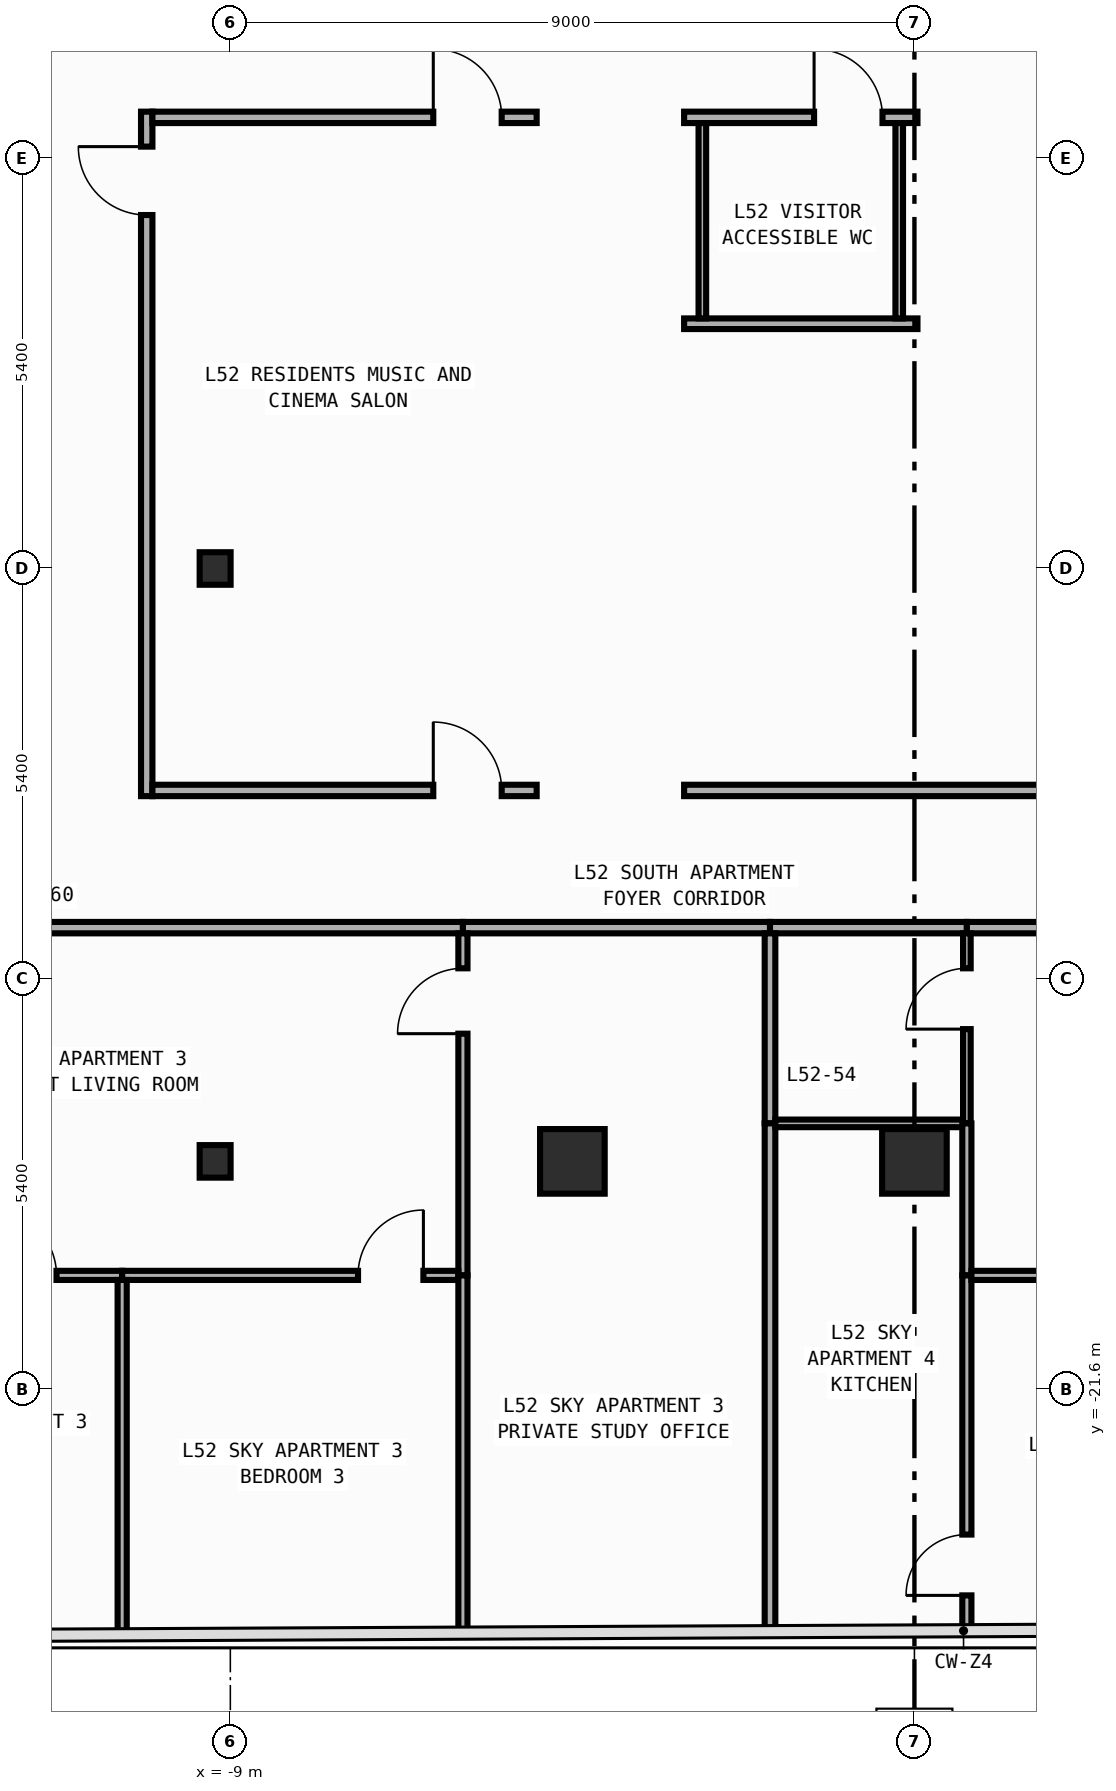
"""IFC4 building model, lengths in metres.
Left out: names, types, materials, properties, quantities, classifications, styles, units other than length and angle.
Written with IfcOpenShell. Run it as: python <this file> out.ifc"""

import sys

from ifc_helpers import new_model, si_unit, direction, frame, frame_2d, origin, origin_2d, place, context, subcontext, project, spatial, rectangle, i_section, extrude, element, fill, save


model = new_model("IFC4")
c1 = context("Model", 3, precision=1e-05, world=origin(), true_north=direction((0.0, 1.0)))
c2 = subcontext(c1, "Body", "Model", "MODEL_VIEW")
j1 = project(units=[si_unit("LENGTHUNIT", "METRE"), si_unit("PLANEANGLEUNIT", "RADIAN")], contexts=[c1])
p1 = place(None, origin())
s1 = spatial("IfcSite", under=j1, at=p1, CompositionType="ELEMENT")
p2 = place(p1, origin())
s2 = spatial("IfcBuilding", under=s1, at=p2, CompositionType="ELEMENT")
p3 = place(p2, frame((0.0, 0.0, 226.0)))
s3 = spatial("IfcBuildingStorey", under=s2, at=p3, CompositionType="ELEMENT", Elevation=226.0)
for number, where, z_axis, x_axis in (
    (1, (-9.2, -18.6, 0.0), (0.0, 0.0, 1.0), (1.0, 0.0, 0.0)),
    (2, (-9.2, -10.8, 0.0), (0.0, 0.0, 1.0), (1.0, 0.0, 0.0)),
):
    element("IfcColumn", number, at=place(p3, frame(where, z_axis=z_axis, x_axis=x_axis)), inside=s3, PredefinedType="COLUMN", context=c2, shape_type="SweptSolid", body=[
        extrude(i_section(OverallWidth=0.407, OverallDepth=0.428, WebThickness=0.02, FlangeThickness=0.035, FilletRadius=0.022, at=origin_2d()), origin(), (0.0, 0.0, 1.0), 3.6),
    ])
for number, where, z_axis, x_axis in (
    (3, (-4.5, -18.6, 0.0), (0.0, 0.0, 1.0), (1.0, 0.0, 0.0)),
    (4, (0.0, -18.6, 0.0), (0.0, 0.0, 1.0), (1.0, 0.0, 0.0)),
):
    element("IfcColumn", number, at=place(p3, frame(where, z_axis=z_axis, x_axis=x_axis)), inside=s3, PredefinedType="COLUMN", context=c2, shape_type="SweptSolid", body=[
        extrude(rectangle(XDim=0.85, YDim=0.85, at=origin_2d()), origin(), (0.0, 0.0, 1.0), 3.6),
    ])
p4 = place(p3, frame((-10.1, -13.795, 0.0), z_axis=(0.0, 0.0, 1.0), x_axis=(0.0, 1.0, 0.0)))
e5 = element("IfcWall", 5, at=p4, inside=s3, PredefinedType="PARTITIONING", context=c2, shape_type="SweptSolid", body=[
    extrude(rectangle(XDim=9.005, YDim=0.15, at=frame_2d((4.502, 0.0))), origin(), (0.0, 0.0, 1.0), 3.34),
])
p5 = place(p4, frame((7.645, 0.0, 0.0)))
e6 = element("IfcOpeningElement", 6, at=p5, cuts=e5, PredefinedType="OPENING", context=c2, shape_type="SweptSolid", body=[
    extrude(rectangle(XDim=0.9, YDim=2.15, at=frame_2d((0.45, 1.075))), frame((0.0, 0.085, 0.0), z_axis=(0.0, -1.0, 0.0), x_axis=(1.0, 0.0, 0.0)), (0.0, 0.0, 1.0), 0.17),
])
p6 = place(p3, frame((-10.025, -4.865, 0.0), z_axis=(0.0, 0.0, 1.0), x_axis=(1.0, 0.0, 0.0)))
e7 = element("IfcWall", 7, at=p6, inside=s3, PredefinedType="PARTITIONING", context=c2, shape_type="SweptSolid", body=[
    extrude(rectangle(XDim=5.055, YDim=0.15, at=frame_2d((2.527, 0.0))), origin(), (0.0, 0.0, 1.0), 3.34),
])
p7 = place(p6, frame((3.695, 0.0, 0.0)))
e8 = element("IfcOpeningElement", 8, at=p7, cuts=e7, PredefinedType="OPENING", context=c2, shape_type="SweptSolid", body=[
    extrude(rectangle(XDim=0.9, YDim=2.15, at=frame_2d((0.45, 1.075))), frame((0.0, 0.085, 0.0), z_axis=(0.0, -1.0, 0.0), x_axis=(1.0, 0.0, 0.0)), (0.0, 0.0, 1.0), 0.17),
])
p8 = place(p3, frame((-3.03, -4.865, 0.0), z_axis=(0.0, 0.0, 1.0), x_axis=(1.0, 0.0, 0.0)))
e9 = element("IfcWall", 9, at=p8, inside=s3, PredefinedType="PARTITIONING", context=c2, shape_type="SweptSolid", body=[
    extrude(rectangle(XDim=3.07, YDim=0.15, at=frame_2d((1.535, 0.0))), origin(), (0.0, 0.0, 1.0), 3.34),
])
p9 = place(p8, frame((1.71, 0.0, 0.0)))
e10 = element("IfcOpeningElement", 10, at=p9, cuts=e9, PredefinedType="OPENING", context=c2, shape_type="SweptSolid", body=[
    extrude(rectangle(XDim=0.9, YDim=2.15, at=frame_2d((0.45, 1.075))), frame((0.0, 0.085, 0.0), z_axis=(0.0, -1.0, 0.0), x_axis=(1.0, 0.0, 0.0)), (0.0, 0.0, 1.0), 0.17),
])
p10 = place(p3, frame((-19.31, -15.525, 0.0), z_axis=(0.0, 0.0, 1.0), x_axis=(1.0, 0.0, 0.0)))
e11 = element("IfcWall", 11, at=p10, inside=s3, PredefinedType="PARTITIONING", context=c2, shape_type="SweptSolid", body=[
    extrude(rectangle(XDim=13.37, YDim=0.15, at=frame_2d((6.685, 0.0))), origin(), (0.0, 0.0, 1.0), 3.34),
])
p11 = place(p10, frame((1.473, 0.0, 0.0)))
e12 = element("IfcOpeningElement", 12, at=p11, cuts=e11, PredefinedType="OPENING", context=c2, shape_type="SweptSolid", body=[
    extrude(rectangle(XDim=0.9, YDim=2.15, at=frame_2d((0.45, 1.075))), frame((0.0, 0.085, 0.0), z_axis=(0.0, -1.0, 0.0), x_axis=(1.0, 0.0, 0.0)), (0.0, 0.0, 1.0), 0.17),
])
p12 = place(p3, frame((-5.94, -15.525, 0.0), z_axis=(0.0, 0.0, 1.0), x_axis=(1.0, 0.0, 0.0)))
e13 = element("IfcWall", 13, at=p12, inside=s3, PredefinedType="PARTITIONING", context=c2, shape_type="SweptSolid", body=[
    extrude(rectangle(XDim=4.04, YDim=0.15, at=frame_2d((2.02, 0.0))), origin(), (0.0, 0.0, 1.0), 3.34),
])
p13 = place(p3, frame((-1.9, -15.525, 0.0), z_axis=(0.0, 0.0, 1.0), x_axis=(1.0, 0.0, 0.0)))
e14 = element("IfcWall", 14, at=p13, inside=s3, PredefinedType="PARTITIONING", context=c2, shape_type="SweptSolid", body=[
    extrude(rectangle(XDim=2.59, YDim=0.15, at=frame_2d((1.295, 0.0))), origin(), (0.0, 0.0, 1.0), 3.34),
])
p14 = place(p3, frame((0.69, -15.525, 0.0), z_axis=(0.0, 0.0, 1.0), x_axis=(1.0, 0.0, 0.0)))
e15 = element("IfcWall", 15, at=p14, inside=s3, PredefinedType="PARTITIONING", context=c2, shape_type="SweptSolid", body=[
    extrude(rectangle(XDim=11.55, YDim=0.15, at=frame_2d((5.775, 0.0))), origin(), (0.0, 0.0, 1.0), 3.34),
])
p15 = place(p14, frame((10.19, 0.0, 0.0)))
e16 = element("IfcOpeningElement", 16, at=p15, cuts=e15, PredefinedType="OPENING", context=c2, shape_type="SweptSolid", body=[
    extrude(rectangle(XDim=0.9, YDim=2.15, at=frame_2d((0.45, 1.075))), frame((0.0, 0.085, 0.0), z_axis=(0.0, -1.0, 0.0), x_axis=(1.0, 0.0, 0.0)), (0.0, 0.0, 1.0), 0.17),
])
p16 = place(p3, frame((-10.025, -13.72, 0.0), z_axis=(0.0, 0.0, 1.0), x_axis=(1.0, 0.0, 0.0)))
e17 = element("IfcWall", 17, at=p16, inside=s3, PredefinedType="PARTITIONING", context=c2, shape_type="SweptSolid", body=[
    extrude(rectangle(XDim=5.055, YDim=0.15, at=frame_2d((2.527, 0.0))), origin(), (0.0, 0.0, 1.0), 3.34),
])
p17 = place(p16, frame((3.695, 0.0, 0.0)))
e18 = element("IfcOpeningElement", 18, at=p17, cuts=e17, PredefinedType="OPENING", context=c2, shape_type="SweptSolid", body=[
    extrude(rectangle(XDim=0.9, YDim=2.15, at=frame_2d((0.45, 1.075))), frame((0.0, 0.085, 0.0), z_axis=(0.0, -1.0, 0.0), x_axis=(1.0, 0.0, 0.0)), (0.0, 0.0, 1.0), 0.17),
])
p18 = place(p3, frame((-3.03, -13.72, 0.0), z_axis=(0.0, 0.0, 1.0), x_axis=(1.0, 0.0, 0.0)))
e19 = element("IfcWall", 19, at=p18, inside=s3, PredefinedType="PARTITIONING", context=c2, shape_type="SweptSolid", body=[
    extrude(rectangle(XDim=13.055, YDim=0.15, at=frame_2d((6.527, 0.0))), origin(), (0.0, 0.0, 1.0), 3.34),
])
p19 = place(p18, frame((4.874, 0.0, 0.0)))
e20 = element("IfcOpeningElement", 20, at=p19, cuts=e19, PredefinedType="OPENING", context=c2, shape_type="SweptSolid", body=[
    extrude(rectangle(XDim=0.9, YDim=2.15, at=frame_2d((0.45, 1.075))), frame((0.0, 0.085, 0.0), z_axis=(0.0, -1.0, 0.0), x_axis=(1.0, 0.0, 0.0)), (0.0, 0.0, 1.0), 0.17),
])
p20 = place(p3, frame((-5.94, -20.1, 0.0), z_axis=(0.0, 0.0, 1.0), x_axis=(0.0, 1.0, 0.0)))
e21 = element("IfcWall", 21, at=p20, inside=s3, PredefinedType="PARTITIONING", context=c2, shape_type="SweptSolid", body=[
    extrude(rectangle(XDim=4.5, YDim=0.12, at=frame_2d((2.25, 0.0))), origin(), (0.0, 0.0, 1.0), 3.34),
])
p21 = place(p20, frame((3.18, 0.0, 0.0)))
e22 = element("IfcOpeningElement", 22, at=p21, cuts=e21, PredefinedType="OPENING", context=c2, shape_type="SweptSolid", body=[
    extrude(rectangle(XDim=0.86, YDim=2.15, at=frame_2d((0.43, 1.075))), frame((0.0, 0.07, 0.0), z_axis=(0.0, -1.0, 0.0), x_axis=(1.0, 0.0, 0.0)), (0.0, 0.0, 1.0), 0.14),
])
p22 = place(p3, frame((-14.827, -20.1, 0.0), z_axis=(0.0, 0.0, 1.0), x_axis=(1.0, 0.0, 0.0)))
e23 = element("IfcWall", 23, at=p22, inside=s3, PredefinedType="PARTITIONING", context=c2, shape_type="SweptSolid", body=[
    extrude(rectangle(XDim=4.404, YDim=0.12, at=frame_2d((2.202, 0.0))), origin(), (0.0, 0.0, 1.0), 3.34),
])
p23 = place(p22, frame((2.68, 0.0, 0.0)))
e24 = element("IfcOpeningElement", 24, at=p23, cuts=e23, PredefinedType="OPENING", context=c2, shape_type="SweptSolid", body=[
    extrude(rectangle(XDim=0.86, YDim=2.15, at=frame_2d((0.43, 1.075))), frame((0.0, 0.07, 0.0), z_axis=(0.0, -1.0, 0.0), x_axis=(1.0, 0.0, 0.0)), (0.0, 0.0, 1.0), 0.14),
])
p24 = place(p3, frame((-10.423, -20.1, 0.0), z_axis=(0.0, 0.0, 1.0), x_axis=(1.0, 0.0, 0.0)))
e25 = element("IfcWall", 25, at=p24, inside=s3, PredefinedType="PARTITIONING", context=c2, shape_type="SweptSolid", body=[
    extrude(rectangle(XDim=4.423, YDim=0.12, at=frame_2d((2.211, 0.0))), origin(), (0.0, 0.0, 1.0), 3.34),
])
p25 = place(p24, frame((3.103, 0.0, 0.0)))
e26 = element("IfcOpeningElement", 26, at=p25, cuts=e25, PredefinedType="OPENING", context=c2, shape_type="SweptSolid", body=[
    extrude(rectangle(XDim=0.86, YDim=2.15, at=frame_2d((0.43, 1.075))), frame((0.0, 0.07, 0.0), z_axis=(0.0, -1.0, 0.0), x_axis=(1.0, 0.0, 0.0)), (0.0, 0.0, 1.0), 0.14),
])
p26 = place(p3, frame((-5.94, -24.802, 0.0), z_axis=(0.0, 0.0, 1.0), x_axis=(0.0, 1.0, 0.0)))
e27 = element("IfcWall", 27, at=p26, inside=s3, PredefinedType="PARTITIONING", context=c2, shape_type="SweptSolid", body=[
    extrude(rectangle(XDim=4.702, YDim=0.12, at=frame_2d((2.351, 0.0))), origin(), (0.0, 0.0, 1.0), 3.34),
])
p27 = place(p3, frame((-1.9, -18.1, 0.0), z_axis=(0.0, 0.0, 1.0), x_axis=(0.0, 1.0, 0.0)))
e28 = element("IfcWall", 28, at=p27, inside=s3, PredefinedType="PARTITIONING", context=c2, shape_type="SweptSolid", body=[
    extrude(rectangle(XDim=2.5, YDim=0.14, at=frame_2d((1.25, 0.0))), origin(), (0.0, 0.0, 1.0), 3.34),
])
p28 = place(p3, frame((-1.9, -24.782, 0.0), z_axis=(0.0, 0.0, 1.0), x_axis=(0.0, 1.0, 0.0)))
e29 = element("IfcWall", 29, at=p28, inside=s3, PredefinedType="PARTITIONING", context=c2, shape_type="SweptSolid", body=[
    extrude(rectangle(XDim=6.682, YDim=0.14, at=frame_2d((3.341, 0.0))), origin(), (0.0, 0.0, 1.0), 3.34),
])
p29 = place(p3, frame((-10.423, -24.823, 0.0), z_axis=(0.0, 0.0, 1.0), x_axis=(0.0, 1.0, 0.0)))
e30 = element("IfcWall", 30, at=p29, inside=s3, PredefinedType="PARTITIONING", context=c2, shape_type="SweptSolid", body=[
    extrude(rectangle(XDim=4.663, YDim=0.12, at=frame_2d((2.332, 0.0))), origin(), (0.0, 0.0, 1.0), 3.34),
])
p30 = place(p3, frame((-1.83, -18.1, 0.0), z_axis=(0.0, 0.0, 1.0), x_axis=(1.0, 0.0, 0.0)))
e31 = element("IfcWall", 31, at=p30, inside=s3, PredefinedType="PARTITIONING", context=c2, shape_type="SweptSolid", body=[
    extrude(rectangle(XDim=2.47, YDim=0.1, at=frame_2d((1.235, 0.0))), origin(), (0.0, 0.0, 1.0), 3.34),
])
p31 = place(p3, frame((0.69, -18.1, 0.0), z_axis=(0.0, 0.0, 1.0), x_axis=(0.0, 1.0, 0.0)))
e32 = element("IfcWall", 32, at=p31, inside=s3, PredefinedType="PARTITIONING", context=c2, shape_type="SweptSolid", body=[
    extrude(rectangle(XDim=2.5, YDim=0.1, at=frame_2d((1.25, 0.0))), origin(), (0.0, 0.0, 1.0), 3.34),
])
p32 = place(p31, frame((1.24, 0.0, 0.0)))
e33 = element("IfcOpeningElement", 33, at=p32, cuts=e32, PredefinedType="OPENING", context=c2, shape_type="SweptSolid", body=[
    extrude(rectangle(XDim=0.8, YDim=2.1, at=frame_2d((0.4, 1.05))), frame((0.0, 0.06, 0.0), z_axis=(0.0, -1.0, 0.0), x_axis=(1.0, 0.0, 0.0)), (0.0, 0.0, 1.0), 0.12),
])
p33 = place(p3, frame((0.69, -20.1, 0.0), z_axis=(0.0, 0.0, 1.0), x_axis=(0.0, 1.0, 0.0)))
e34 = element("IfcWall", 34, at=p33, inside=s3, PredefinedType="PARTITIONING", context=c2, shape_type="SweptSolid", body=[
    extrude(rectangle(XDim=2.0, YDim=0.12, at=frame_2d((1.0, 0.0))), origin(), (0.0, 0.0, 1.0), 3.34),
])
p34 = place(p3, frame((0.69, -24.77, 0.0), z_axis=(0.0, 0.0, 1.0), x_axis=(0.0, 1.0, 0.0)))
e35 = element("IfcWall", 35, at=p34, inside=s3, PredefinedType="PARTITIONING", context=c2, shape_type="SweptSolid", body=[
    extrude(rectangle(XDim=4.67, YDim=0.12, at=frame_2d((2.335, 0.0))), origin(), (0.0, 0.0, 1.0), 3.34),
])
p35 = place(p34, frame((0.46, 0.0, 0.0)))
e36 = element("IfcOpeningElement", 36, at=p35, cuts=e35, PredefinedType="OPENING", context=c2, shape_type="SweptSolid", body=[
    extrude(rectangle(XDim=0.8, YDim=2.1, at=frame_2d((0.4, 1.05))), frame((0.0, 0.07, 0.0), z_axis=(0.0, -1.0, 0.0), x_axis=(1.0, 0.0, 0.0)), (0.0, 0.0, 1.0), 0.14),
])
p36 = place(p3, frame((0.75, -20.1, 0.0), z_axis=(0.0, 0.0, 1.0), x_axis=(1.0, 0.0, 0.0)))
e37 = element("IfcWall", 37, at=p36, inside=s3, PredefinedType="PARTITIONING", context=c2, shape_type="SweptSolid", body=[
    extrude(rectangle(XDim=4.467, YDim=0.12, at=frame_2d((2.233, 0.0))), origin(), (0.0, 0.0, 1.0), 3.34),
])
p37 = place(p36, frame((1.08, 0.0, 0.0)))
e38 = element("IfcOpeningElement", 38, at=p37, cuts=e37, PredefinedType="OPENING", context=c2, shape_type="SweptSolid", body=[
    extrude(rectangle(XDim=0.86, YDim=2.15, at=frame_2d((0.43, 1.075))), frame((0.0, 0.07, 0.0), z_axis=(0.0, -1.0, 0.0), x_axis=(1.0, 0.0, 0.0)), (0.0, 0.0, 1.0), 0.14),
])
p38 = place(p3, frame((-3.03, -7.58, 0.0), z_axis=(0.0, 0.0, 1.0), x_axis=(1.0, 0.0, 0.0)))
e39 = element("IfcWall", 39, at=p38, inside=s3, PredefinedType="PARTITIONING", context=c2, shape_type="SweptSolid", body=[
    extrude(rectangle(XDim=3.07, YDim=0.14, at=frame_2d((1.535, 0.0))), origin(), (0.0, 0.0, 1.0), 3.34),
])
for number, where, z_axis, x_axis in (
    (40, (-0.2, -4.94, 0.0), (0.0, 0.0, 1.0), (0.0, -1.0, 0.0)),
    (41, (-2.79, -7.51, 0.0), (0.0, 0.0, 1.0), (0.0, 1.0, 0.0)),
):
    element("IfcWall", number, at=place(p3, frame(where, z_axis=z_axis, x_axis=x_axis)), inside=s3, PredefinedType="PARTITIONING", context=c2, shape_type="SweptSolid", body=[
        extrude(rectangle(XDim=2.57, YDim=0.1, at=frame_2d((1.285, 0.0))), origin(), (0.0, 0.0, 1.0), 3.34),
    ])
p39 = place(p5, origin())
e42 = element("IfcDoor", 42, at=p39, inside=s3, OperationType="SINGLE_SWING_RIGHT", PredefinedType="DOOR", context=c2, shape_type="SweptSolid", body=[
    extrude(rectangle(XDim=0.9, YDim=2.15, at=frame_2d((0.45, 1.075))), frame((0.0, 0.025, 0.0), z_axis=(0.0, -1.0, 0.0), x_axis=(1.0, 0.0, 0.0)), (0.0, 0.0, 1.0), 0.05),
])
fill(e6, e42)
p40 = place(p7, origin())
e43 = element("IfcDoor", 43, at=p40, inside=s3, OperationType="SINGLE_SWING_LEFT", PredefinedType="DOOR", context=c2, shape_type="SweptSolid", body=[
    extrude(rectangle(XDim=0.9, YDim=2.15, at=frame_2d((0.45, 1.075))), frame((0.0, 0.025, 0.0), z_axis=(0.0, -1.0, 0.0), x_axis=(1.0, 0.0, 0.0)), (0.0, 0.0, 1.0), 0.05),
])
fill(e8, e43)
p41 = place(p9, origin())
e44 = element("IfcDoor", 44, at=p41, inside=s3, OperationType="SINGLE_SWING_LEFT", PredefinedType="DOOR", context=c2, shape_type="SweptSolid", body=[
    extrude(rectangle(XDim=0.9, YDim=2.15, at=frame_2d((0.45, 1.075))), frame((0.0, 0.025, 0.0), z_axis=(0.0, -1.0, 0.0), x_axis=(1.0, 0.0, 0.0)), (0.0, 0.0, 1.0), 0.05),
])
fill(e10, e44)
p42 = place(p17, origin())
e45 = element("IfcDoor", 45, at=p42, inside=s3, OperationType="SINGLE_SWING_LEFT", PredefinedType="DOOR", context=c2, shape_type="SweptSolid", body=[
    extrude(rectangle(XDim=0.9, YDim=2.15, at=frame_2d((0.45, 1.075))), frame((0.0, 0.025, 0.0), z_axis=(0.0, -1.0, 0.0), x_axis=(1.0, 0.0, 0.0)), (0.0, 0.0, 1.0), 0.05),
])
fill(e18, e45)
p43 = place(p21, origin())
e46 = element("IfcDoor", 46, at=p43, inside=s3, OperationType="SINGLE_SWING_LEFT", PredefinedType="DOOR", context=c2, shape_type="SweptSolid", body=[
    extrude(rectangle(XDim=0.86, YDim=2.15, at=frame_2d((0.43, 1.075))), frame((0.0, 0.025, 0.0), z_axis=(0.0, -1.0, 0.0), x_axis=(1.0, 0.0, 0.0)), (0.0, 0.0, 1.0), 0.05),
])
fill(e22, e46)
p44 = place(p23, origin())
e47 = element("IfcDoor", 47, at=p44, inside=s3, OperationType="SINGLE_SWING_LEFT", PredefinedType="DOOR", context=c2, shape_type="SweptSolid", body=[
    extrude(rectangle(XDim=0.86, YDim=2.15, at=frame_2d((0.43, 1.075))), frame((0.0, 0.025, 0.0), z_axis=(0.0, -1.0, 0.0), x_axis=(1.0, 0.0, 0.0)), (0.0, 0.0, 1.0), 0.05),
])
fill(e24, e47)
p45 = place(p25, origin())
e48 = element("IfcDoor", 48, at=p45, inside=s3, OperationType="SINGLE_SWING_RIGHT", PredefinedType="DOOR", context=c2, shape_type="SweptSolid", body=[
    extrude(rectangle(XDim=0.86, YDim=2.15, at=frame_2d((0.43, 1.075))), frame((0.0, 0.025, 0.0), z_axis=(0.0, -1.0, 0.0), x_axis=(1.0, 0.0, 0.0)), (0.0, 0.0, 1.0), 0.05),
])
fill(e26, e48)
p46 = place(p32, origin())
e49 = element("IfcDoor", 49, at=p46, inside=s3, OperationType="SINGLE_SWING_LEFT", PredefinedType="DOOR", context=c2, shape_type="SweptSolid", body=[
    extrude(rectangle(XDim=0.8, YDim=2.1, at=frame_2d((0.4, 1.05))), frame((0.0, 0.025, 0.0), z_axis=(0.0, -1.0, 0.0), x_axis=(1.0, 0.0, 0.0)), (0.0, 0.0, 1.0), 0.05),
])
fill(e33, e49)
p47 = place(p35, origin())
e50 = element("IfcDoor", 50, at=p47, inside=s3, OperationType="SINGLE_SWING_LEFT", PredefinedType="DOOR", context=c2, shape_type="SweptSolid", body=[
    extrude(rectangle(XDim=0.8, YDim=2.1, at=frame_2d((0.4, 1.05))), frame((0.0, 0.025, 0.0), z_axis=(0.0, -1.0, 0.0), x_axis=(1.0, 0.0, 0.0)), (0.0, 0.0, 1.0), 0.05),
])
fill(e36, e50)
save(model, sys.argv[1])
